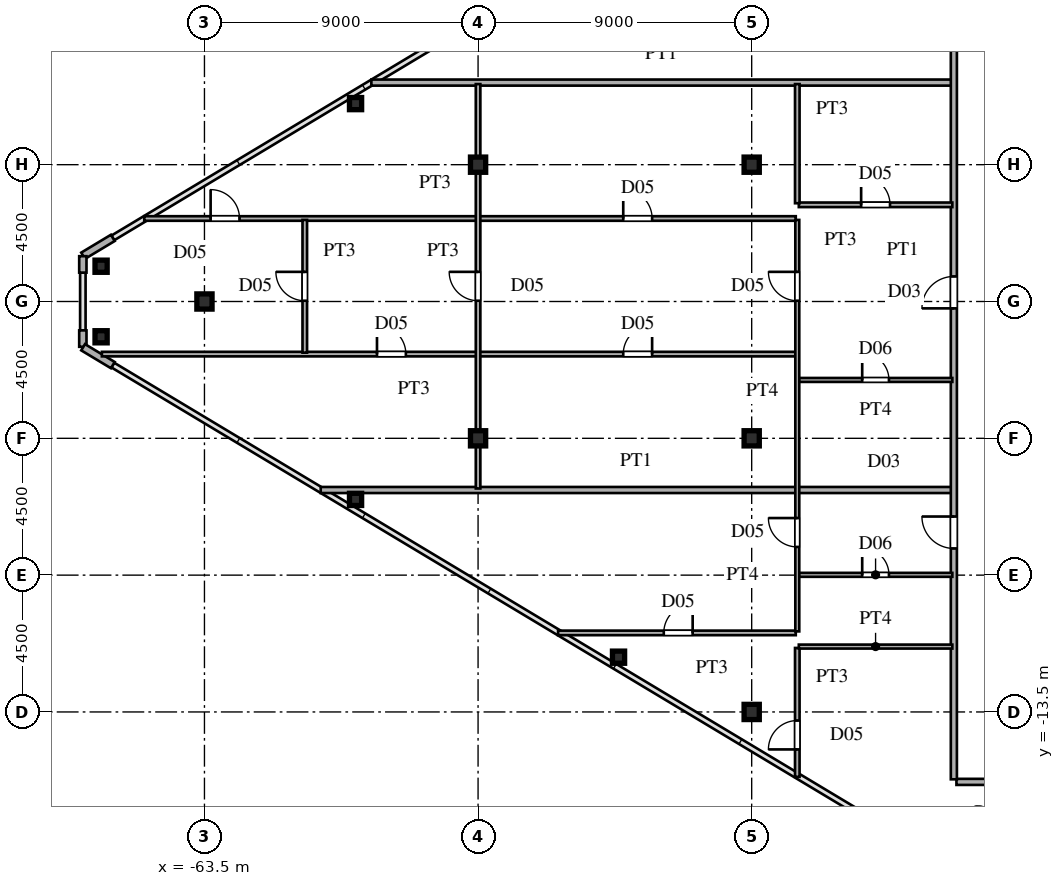
"""IFC4 building model, lengths in metres.
Left out: names, types, materials, properties, quantities, classifications, styles, units other than length and angle.
Written with IfcOpenShell. Run it as: python <this file> out.ifc"""

import sys

from ifc_helpers import new_model, si_unit, direction, frame, frame_2d, origin, origin_2d, place, context, subcontext, project, spatial, rectangle, hollow_rectangle, i_section, extrude, source, transform, mapped, element, fill, save


model = new_model("IFC4")
c1 = context("Model", 3, precision=1e-05, world=origin(), true_north=direction((0.0, 1.0)))
c2 = subcontext(c1, "Body", "Model", "MODEL_VIEW")
j1 = project(units=[si_unit("LENGTHUNIT", "METRE"), si_unit("PLANEANGLEUNIT", "RADIAN")], contexts=[c1])
p1 = place(None, origin())
s1 = spatial("IfcSite", under=j1, at=p1, CompositionType="ELEMENT")
p2 = place(p1, origin())
s2 = spatial("IfcBuilding", under=s1, at=p2, CompositionType="ELEMENT")
p3 = place(p2, frame((0.0, 0.0, 195.9)))
s3 = spatial("IfcBuildingStorey", under=s2, at=p3, CompositionType="ELEMENT", Elevation=195.9)
m1 = source(origin(), c2, "Body", "SweptSolid", [
    extrude(i_section(OverallWidth=0.5, OverallDepth=0.5, WebThickness=0.02, FlangeThickness=0.032, at=origin_2d()), origin(), (0.0, 0.0, 1.0), 3.6),
])
for number, where, z_axis, x_axis in (
    (1, (-45.5, -13.5, 0.0), (0.0, 0.0, 1.0), (1.0, 0.0, 0.0)),
    (2, (-45.5, -4.5, 0.0), (0.0, 0.0, 1.0), (1.0, 0.0, 0.0)),
    (3, (-45.5, 4.5, 0.0), (0.0, 0.0, 1.0), (1.0, 0.0, 0.0)),
    (4, (-54.5, -4.5, 0.0), (0.0, 0.0, 1.0), (1.0, 0.0, 0.0)),
    (5, (-54.5, 4.5, 0.0), (0.0, 0.0, 1.0), (1.0, 0.0, 0.0)),
    (6, (-63.5, 0.0, 0.0), (0.0, 0.0, 1.0), (1.0, 0.0, 0.0)),
):
    element("IfcColumn", number, at=place(p3, frame(where, z_axis=z_axis, x_axis=x_axis)), inside=s3, PredefinedType="COLUMN", context=c2, shape_type="MappedRepresentation", body=[
        mapped(m1, transform((0.0, 0.0, 0.0), scale=1.0)),
    ])
m2 = source(origin(), c2, "Body", "SweptSolid", [
    extrude(hollow_rectangle(XDim=0.4, YDim=0.4, WallThickness=0.016, at=origin_2d()), origin(), (0.0, 0.0, 1.0), 3.6),
])
for number, where, z_axis, x_axis in (
    (7, (-66.9, 1.16, 0.0), (0.0, 0.0, 1.0), (1.0, 0.0, 0.0)),
    (8, (-66.9, -1.16, 0.0), (0.0, 0.0, 1.0), (1.0, 0.0, 0.0)),
    (9, (-49.88, -11.699, 0.0), (0.0, 0.0, 1.0), (1.0, 0.0, 0.0)),
    (10, (-58.53, -6.509, 0.0), (0.0, 0.0, 1.0), (1.0, 0.0, 0.0)),
    (11, (-58.53, 6.509, 0.0), (0.0, 0.0, 1.0), (1.0, 0.0, 0.0)),
):
    element("IfcColumn", number, at=place(p3, frame(where, z_axis=z_axis, x_axis=x_axis)), inside=s3, PredefinedType="COLUMN", context=c2, shape_type="MappedRepresentation", body=[
        mapped(m2, transform((0.0, 0.0, 0.0), scale=1.0)),
    ])
p4 = place(p3, frame((-66.514, 2.092, 0.0), z_axis=(0.0, 0.0, 1.0), x_axis=(-0.85743623509, -0.514590228002, 0.0)))
e12 = element("IfcWall", 12, at=p4, inside=s3, PredefinedType="SOLIDWALL", context=c2, shape_type="SweptSolid", body=[
    extrude(rectangle(XDim=1.14, YDim=0.24, at=frame_2d((0.57, 0.0))), origin(), (0.0, 0.0, 1.0), 3.38),
])
for number, where, z_axis, x_axis in (
    (13, (-67.5, 1.49, 0.0), (0.0, 0.0, 1.0), (0.0, -1.0, 0.0)),
    (14, (-67.5, -0.95, 0.0), (0.0, 0.0, 1.0), (0.0, -1.0, 0.0)),
):
    element("IfcWall", number, at=place(p3, frame(where, z_axis=z_axis, x_axis=x_axis)), inside=s3, PredefinedType="SOLIDWALL", context=c2, shape_type="SweptSolid", body=[
        extrude(rectangle(XDim=0.54, YDim=0.24, at=frame_2d((0.27, 0.0))), origin(), (0.0, 0.0, 1.0), 3.38),
    ])
p5 = place(p3, frame((-67.491, -1.505, 0.0), z_axis=(0.0, 0.0, 1.0), x_axis=(0.85743623509, -0.514590228002, 0.0)))
e15 = element("IfcWall", 15, at=p5, inside=s3, PredefinedType="SOLIDWALL", context=c2, shape_type="SweptSolid", body=[
    extrude(rectangle(XDim=1.14, YDim=0.24, at=frame_2d((0.57, 0.0))), origin(), (0.0, 0.0, 1.0), 3.38),
])
p6 = place(p3, frame((-38.765, -15.8, 0.0), z_axis=(0.0, 0.0, 1.0), x_axis=(1.0, 0.0, 0.0)))
e16 = element("IfcWall", 16, at=p6, inside=s3, PredefinedType="PARTITIONING", context=c2, shape_type="SweptSolid", body=[
    extrude(rectangle(XDim=11.14, YDim=0.2, at=frame_2d((5.57, 0.0))), origin(), (0.0, 0.0, 1.0), 3.38),
])
p7 = place(p3, frame((-43.95, -11.35, 0.0), z_axis=(0.0, 0.0, 1.0), x_axis=(1.0, 0.0, 0.0)))
e17 = element("IfcWall", 17, at=p7, inside=s3, PredefinedType="PARTITIONING", context=c2, shape_type="SweptSolid", body=[
    extrude(rectangle(XDim=5.05, YDim=0.13, at=frame_2d((2.525, 0.0))), origin(), (0.0, 0.0, 1.0), 3.38),
])
p8 = place(p3, frame((-51.868, -10.9, 0.0), z_axis=(0.0, 0.0, 1.0), x_axis=(1.0, 0.0, 0.0)))
e18 = element("IfcWall", 18, at=p8, inside=s3, PredefinedType="PARTITIONING", context=c2, shape_type="SweptSolid", body=[
    extrude(rectangle(XDim=7.818, YDim=0.15, at=frame_2d((3.909, 0.0))), origin(), (0.0, 0.0, 1.0), 3.38),
])
p9 = place(p8, frame((3.476, 0.0, 0.0)))
e19 = element("IfcOpeningElement", 19, at=p9, cuts=e18, PredefinedType="OPENING", context=c2, shape_type="SweptSolid", body=[
    extrude(rectangle(XDim=0.95, YDim=2.15, at=frame_2d((0.475, 1.075))), frame((0.0, 0.085, 0.0), z_axis=(0.0, -1.0, 0.0), x_axis=(1.0, 0.0, 0.0)), (0.0, 0.0, 1.0), 0.17),
])
p10 = place(p3, frame((-43.95, -8.99, 0.0), z_axis=(0.0, 0.0, 1.0), x_axis=(1.0, 0.0, 0.0)))
e20 = element("IfcWall", 20, at=p10, inside=s3, PredefinedType="PARTITIONING", context=c2, shape_type="SweptSolid", body=[
    extrude(rectangle(XDim=5.05, YDim=0.13, at=frame_2d((2.525, 0.0))), origin(), (0.0, 0.0, 1.0), 3.38),
])
p11 = place(p10, frame((2.085, 0.0, 0.0)))
e21 = element("IfcOpeningElement", 21, at=p11, cuts=e20, PredefinedType="OPENING", context=c2, shape_type="SweptSolid", body=[
    extrude(rectangle(XDim=0.88, YDim=2.1, at=frame_2d((0.44, 1.05))), frame((0.0, 0.075, 0.0), z_axis=(0.0, -1.0, 0.0), x_axis=(1.0, 0.0, 0.0)), (0.0, 0.0, 1.0), 0.15),
])
p12 = place(p3, frame((-59.676, -6.2, 0.0), z_axis=(0.0, 0.0, 1.0), x_axis=(1.0, 0.0, 0.0)))
e22 = element("IfcWall", 22, at=p12, inside=s3, PredefinedType="PARTITIONING", context=c2, shape_type="SweptSolid", body=[
    extrude(rectangle(XDim=20.746, YDim=0.2, at=frame_2d((10.373, 0.0))), origin(), (0.0, 0.0, 1.0), 3.38),
])
p13 = place(p3, frame((-43.95, -2.58, 0.0), z_axis=(0.0, 0.0, 1.0), x_axis=(1.0, 0.0, 0.0)))
e23 = element("IfcWall", 23, at=p13, inside=s3, PredefinedType="PARTITIONING", context=c2, shape_type="SweptSolid", body=[
    extrude(rectangle(XDim=5.05, YDim=0.13, at=frame_2d((2.525, 0.0))), origin(), (0.0, 0.0, 1.0), 3.38),
])
p14 = place(p13, frame((2.085, 0.0, 0.0)))
e24 = element("IfcOpeningElement", 24, at=p14, cuts=e23, PredefinedType="OPENING", context=c2, shape_type="SweptSolid", body=[
    extrude(rectangle(XDim=0.88, YDim=2.1, at=frame_2d((0.44, 1.05))), frame((0.0, 0.075, 0.0), z_axis=(0.0, -1.0, 0.0), x_axis=(1.0, 0.0, 0.0)), (0.0, 0.0, 1.0), 0.15),
])
p15 = place(p3, frame((-66.874, -1.73, 0.0), z_axis=(0.0, 0.0, 1.0), x_axis=(1.0, 0.0, 0.0)))
e25 = element("IfcWall", 25, at=p15, inside=s3, PredefinedType="PARTITIONING", context=c2, shape_type="SweptSolid", body=[
    extrude(rectangle(XDim=22.824, YDim=0.15, at=frame_2d((11.412, 0.0))), origin(), (0.0, 0.0, 1.0), 3.38),
])
p16 = place(p15, frame((17.149, 0.0, 0.0)))
e26 = element("IfcOpeningElement", 26, at=p16, cuts=e25, PredefinedType="OPENING", context=c2, shape_type="SweptSolid", body=[
    extrude(rectangle(XDim=0.95, YDim=2.15, at=frame_2d((0.475, 1.075))), frame((0.0, 0.085, 0.0), z_axis=(0.0, -1.0, 0.0), x_axis=(1.0, 0.0, 0.0)), (0.0, 0.0, 1.0), 0.17),
])
p17 = place(p15, frame((9.049, 0.0, 0.0)))
e27 = element("IfcOpeningElement", 27, at=p17, cuts=e25, PredefinedType="OPENING", context=c2, shape_type="SweptSolid", body=[
    extrude(rectangle(XDim=0.95, YDim=2.15, at=frame_2d((0.475, 1.075))), frame((0.0, 0.085, 0.0), z_axis=(0.0, -1.0, 0.0), x_axis=(1.0, 0.0, 0.0)), (0.0, 0.0, 1.0), 0.17),
])
p18 = place(p3, frame((-65.48, 2.73, 0.0), z_axis=(0.0, 0.0, 1.0), x_axis=(1.0, 0.0, 0.0)))
e28 = element("IfcWall", 28, at=p18, inside=s3, PredefinedType="PARTITIONING", context=c2, shape_type="SweptSolid", body=[
    extrude(rectangle(XDim=21.43, YDim=0.15, at=frame_2d((10.715, 0.0))), origin(), (0.0, 0.0, 1.0), 3.38),
])
p19 = place(p18, frame((15.755, 0.0, 0.0)))
e29 = element("IfcOpeningElement", 29, at=p19, cuts=e28, PredefinedType="OPENING", context=c2, shape_type="SweptSolid", body=[
    extrude(rectangle(XDim=0.95, YDim=2.15, at=frame_2d((0.475, 1.075))), frame((0.0, 0.085, 0.0), z_axis=(0.0, -1.0, 0.0), x_axis=(1.0, 0.0, 0.0)), (0.0, 0.0, 1.0), 0.17),
])
p20 = place(p18, frame((2.183, 0.0, 0.0)))
e30 = element("IfcOpeningElement", 30, at=p20, cuts=e28, PredefinedType="OPENING", context=c2, shape_type="SweptSolid", body=[
    extrude(rectangle(XDim=0.95, YDim=2.15, at=frame_2d((0.475, 1.075))), frame((0.0, 0.085, 0.0), z_axis=(0.0, -1.0, 0.0), x_axis=(1.0, 0.0, 0.0)), (0.0, 0.0, 1.0), 0.17),
])
p21 = place(p3, frame((-43.95, 3.18, 0.0), z_axis=(0.0, 0.0, 1.0), x_axis=(1.0, 0.0, 0.0)))
e31 = element("IfcWall", 31, at=p21, inside=s3, PredefinedType="PARTITIONING", context=c2, shape_type="SweptSolid", body=[
    extrude(rectangle(XDim=5.05, YDim=0.15, at=frame_2d((2.525, 0.0))), origin(), (0.0, 0.0, 1.0), 3.38),
])
p22 = place(p21, frame((2.05, 0.0, 0.0)))
e32 = element("IfcOpeningElement", 32, at=p22, cuts=e31, PredefinedType="OPENING", context=c2, shape_type="SweptSolid", body=[
    extrude(rectangle(XDim=0.95, YDim=2.15, at=frame_2d((0.475, 1.075))), frame((0.0, 0.085, 0.0), z_axis=(0.0, -1.0, 0.0), x_axis=(1.0, 0.0, 0.0)), (0.0, 0.0, 1.0), 0.17),
])
p23 = place(p3, frame((-58.01, 7.2, 0.0), z_axis=(0.0, 0.0, 1.0), x_axis=(1.0, 0.0, 0.0)))
e33 = element("IfcWall", 33, at=p23, inside=s3, PredefinedType="PARTITIONING", context=c2, shape_type="SweptSolid", body=[
    extrude(rectangle(XDim=19.08, YDim=0.2, at=frame_2d((9.54, 0.0))), origin(), (0.0, 0.0, 1.0), 3.38),
])
p24 = place(p3, frame((-60.2, -1.683, 0.0), z_axis=(0.0, 0.0, 1.0), x_axis=(0.0, 1.0, 0.0)))
e34 = element("IfcWall", 34, at=p24, inside=s3, PredefinedType="PARTITIONING", context=c2, shape_type="SweptSolid", body=[
    extrude(rectangle(XDim=4.366, YDim=0.15, at=frame_2d((2.183, 0.0))), origin(), (0.0, 0.0, 1.0), 3.38),
])
p25 = place(p24, frame((1.708, 0.0, 0.0)))
e35 = element("IfcOpeningElement", 35, at=p25, cuts=e34, PredefinedType="OPENING", context=c2, shape_type="SweptSolid", body=[
    extrude(rectangle(XDim=0.95, YDim=2.15, at=frame_2d((0.475, 1.075))), frame((0.0, 0.085, 0.0), z_axis=(0.0, -1.0, 0.0), x_axis=(1.0, 0.0, 0.0)), (0.0, 0.0, 1.0), 0.17),
])
p26 = place(p3, frame((-54.5, -6.15, 0.0), z_axis=(0.0, 0.0, 1.0), x_axis=(0.0, 1.0, 0.0)))
e36 = element("IfcWall", 36, at=p26, inside=s3, PredefinedType="PARTITIONING", context=c2, shape_type="SweptSolid", body=[
    extrude(rectangle(XDim=13.3, YDim=0.15, at=frame_2d((6.65, 0.0))), origin(), (0.0, 0.0, 1.0), 2.78),
])
p27 = place(p26, frame((6.175, 0.0, 0.0)))
e37 = element("IfcOpeningElement", 37, at=p27, cuts=e36, PredefinedType="OPENING", context=c2, shape_type="SweptSolid", body=[
    extrude(rectangle(XDim=0.95, YDim=2.15, at=frame_2d((0.475, 1.075))), frame((0.0, 0.085, 0.0), z_axis=(0.0, -1.0, 0.0), x_axis=(1.0, 0.0, 0.0)), (0.0, 0.0, 1.0), 0.17),
])
p28 = place(p3, frame((-44.0, -15.635, 0.0), z_axis=(0.0, 0.0, 1.0), x_axis=(0.0, 1.0, 0.0)))
e38 = element("IfcWall", 38, at=p28, inside=s3, PredefinedType="PARTITIONING", context=c2, shape_type="SweptSolid", body=[
    extrude(rectangle(XDim=4.24, YDim=0.15, at=frame_2d((2.12, 0.0))), origin(), (0.0, 0.0, 1.0), 3.38),
])
p29 = place(p28, frame((0.903, 0.0, 0.0)))
e39 = element("IfcOpeningElement", 39, at=p29, cuts=e38, PredefinedType="OPENING", context=c2, shape_type="SweptSolid", body=[
    extrude(rectangle(XDim=0.95, YDim=2.15, at=frame_2d((0.475, 1.075))), frame((0.0, 0.085, 0.0), z_axis=(0.0, -1.0, 0.0), x_axis=(1.0, 0.0, 0.0)), (0.0, 0.0, 1.0), 0.17),
])
p30 = place(p3, frame((-44.0, -10.85, 0.0), z_axis=(0.0, 0.0, 1.0), x_axis=(0.0, 1.0, 0.0)))
e40 = element("IfcWall", 40, at=p30, inside=s3, PredefinedType="PARTITIONING", context=c2, shape_type="SweptSolid", body=[
    extrude(rectangle(XDim=13.533, YDim=0.13, at=frame_2d((6.767, 0.0))), origin(), (0.0, 0.0, 1.0), 3.38),
])
p31 = place(p30, frame((2.778, 0.0, 0.0)))
e41 = element("IfcOpeningElement", 41, at=p31, cuts=e40, PredefinedType="OPENING", context=c2, shape_type="SweptSolid", body=[
    extrude(rectangle(XDim=0.95, YDim=2.15, at=frame_2d((0.475, 1.075))), frame((0.0, 0.075, 0.0), z_axis=(0.0, -1.0, 0.0), x_axis=(1.0, 0.0, 0.0)), (0.0, 0.0, 1.0), 0.15),
])
p32 = place(p30, frame((10.875, 0.0, 0.0)))
e42 = element("IfcOpeningElement", 42, at=p32, cuts=e40, PredefinedType="OPENING", context=c2, shape_type="SweptSolid", body=[
    extrude(rectangle(XDim=0.95, YDim=2.15, at=frame_2d((0.475, 1.075))), frame((0.0, 0.075, 0.0), z_axis=(0.0, -1.0, 0.0), x_axis=(1.0, 0.0, 0.0)), (0.0, 0.0, 1.0), 0.15),
])
p33 = place(p3, frame((-44.0, 3.232, 0.0), z_axis=(0.0, 0.0, 1.0), x_axis=(0.0, 1.0, 0.0)))
e43 = element("IfcWall", 43, at=p33, inside=s3, PredefinedType="PARTITIONING", context=c2, shape_type="SweptSolid", body=[
    extrude(rectangle(XDim=3.918, YDim=0.15, at=frame_2d((1.959, 0.0))), origin(), (0.0, 0.0, 1.0), 3.38),
])
p34 = place(p3, frame((-38.85, -15.715, 0.0), z_axis=(0.0, 0.0, 1.0), x_axis=(0.0, 1.0, 0.0)))
e44 = element("IfcWall", 44, at=p34, inside=s3, PredefinedType="PARTITIONING", context=c2, shape_type="SweptSolid", body=[
    extrude(rectangle(XDim=31.43, YDim=0.2, at=frame_2d((15.715, 0.0))), origin(), (0.0, 0.0, 1.0), 3.38),
])
p35 = place(p34, frame((7.593, 0.0, 0.0)))
e45 = element("IfcOpeningElement", 45, at=p35, cuts=e44, PredefinedType="OPENING", context=c2, shape_type="SweptSolid", body=[
    extrude(rectangle(XDim=1.05, YDim=2.25, at=frame_2d((0.525, 1.125))), frame((0.0, 0.11, 0.0), z_axis=(0.0, -1.0, 0.0), x_axis=(1.0, 0.0, 0.0)), (0.0, 0.0, 1.0), 0.22),
])
p36 = place(p34, frame((15.489, 0.0, 0.0)))
e46 = element("IfcOpeningElement", 46, at=p36, cuts=e44, PredefinedType="OPENING", context=c2, shape_type="SweptSolid", body=[
    extrude(rectangle(XDim=1.05, YDim=2.25, at=frame_2d((0.525, 1.125))), frame((0.0, 0.11, 0.0), z_axis=(0.0, -1.0, 0.0), x_axis=(1.0, 0.0, 0.0)), (0.0, 0.0, 1.0), 0.22),
])
p37 = place(p34, frame((26.69, 0.0, 0.0)))
e47 = element("IfcOpeningElement", 47, at=p37, cuts=e44, PredefinedType="OPENING", context=c2, shape_type="SweptSolid", body=[
    extrude(rectangle(XDim=1.05, YDim=2.25, at=frame_2d((0.525, 1.125))), frame((0.0, 0.11, 0.0), z_axis=(0.0, -1.0, 0.0), x_axis=(1.0, 0.0, 0.0)), (0.0, 0.0, 1.0), 0.22),
])
m3 = source(origin(), c2, "Body", "SweptSolid", [
    extrude(rectangle(XDim=0.95, YDim=2.15, at=frame_2d((0.475, 1.075))), frame((0.0, 0.025, 0.0), z_axis=(0.0, -1.0, 0.0), x_axis=(1.0, 0.0, 0.0)), (0.0, 0.0, 1.0), 0.05),
])
p38 = place(p9, origin())
e48 = element("IfcDoor", 48, at=p38, inside=s3, OperationType="SINGLE_SWING_RIGHT", PredefinedType="DOOR", context=c2, shape_type="MappedRepresentation", body=[
    mapped(m3, transform((0.0, 0.0, 0.0), scale=1.0)),
])
fill(e19, e48)
m4 = source(origin(), c2, "Body", "SweptSolid", [
    extrude(rectangle(XDim=0.88, YDim=2.1, at=frame_2d((0.44, 1.05))), frame((0.0, 0.025, 0.0), z_axis=(0.0, -1.0, 0.0), x_axis=(1.0, 0.0, 0.0)), (0.0, 0.0, 1.0), 0.05),
])
p39 = place(p11, origin())
e49 = element("IfcDoor", 49, at=p39, inside=s3, OperationType="SINGLE_SWING_LEFT", PredefinedType="DOOR", context=c2, shape_type="MappedRepresentation", body=[
    mapped(m4, transform((0.0, 0.0, 0.0), scale=1.0)),
])
fill(e21, e49)
p40 = place(p14, origin())
e50 = element("IfcDoor", 50, at=p40, inside=s3, OperationType="SINGLE_SWING_LEFT", PredefinedType="DOOR", context=c2, shape_type="MappedRepresentation", body=[
    mapped(m4, transform((0.0, 0.0, 0.0), scale=1.0)),
])
fill(e24, e50)
p41 = place(p16, origin())
e51 = element("IfcDoor", 51, at=p41, inside=s3, OperationType="SINGLE_SWING_RIGHT", PredefinedType="DOOR", context=c2, shape_type="MappedRepresentation", body=[
    mapped(m3, transform((0.0, 0.0, 0.0), scale=1.0)),
])
fill(e26, e51)
p42 = place(p17, origin())
e52 = element("IfcDoor", 52, at=p42, inside=s3, OperationType="SINGLE_SWING_LEFT", PredefinedType="DOOR", context=c2, shape_type="MappedRepresentation", body=[
    mapped(m3, transform((0.0, 0.0, 0.0), scale=1.0)),
])
fill(e27, e52)
p43 = place(p19, origin())
e53 = element("IfcDoor", 53, at=p43, inside=s3, OperationType="SINGLE_SWING_LEFT", PredefinedType="DOOR", context=c2, shape_type="MappedRepresentation", body=[
    mapped(m3, transform((0.0, 0.0, 0.0), scale=1.0)),
])
fill(e29, e53)
p44 = place(p20, origin())
e54 = element("IfcDoor", 54, at=p44, inside=s3, OperationType="SINGLE_SWING_LEFT", PredefinedType="DOOR", context=c2, shape_type="MappedRepresentation", body=[
    mapped(m3, transform((0.0, 0.0, 0.0), scale=1.0)),
])
fill(e30, e54)
p45 = place(p22, origin())
e55 = element("IfcDoor", 55, at=p45, inside=s3, OperationType="SINGLE_SWING_LEFT", PredefinedType="DOOR", context=c2, shape_type="MappedRepresentation", body=[
    mapped(m3, transform((0.0, 0.0, 0.0), scale=1.0)),
])
fill(e32, e55)
p46 = place(p25, origin())
e56 = element("IfcDoor", 56, at=p46, inside=s3, OperationType="SINGLE_SWING_RIGHT", PredefinedType="DOOR", context=c2, shape_type="MappedRepresentation", body=[
    mapped(m3, transform((0.0, 0.0, 0.0), scale=1.0)),
])
fill(e35, e56)
p47 = place(p27, origin())
e57 = element("IfcDoor", 57, at=p47, inside=s3, OperationType="SINGLE_SWING_RIGHT", PredefinedType="DOOR", context=c2, shape_type="MappedRepresentation", body=[
    mapped(m3, transform((0.0, 0.0, 0.0), scale=1.0)),
])
fill(e37, e57)
p48 = place(p29, origin())
e58 = element("IfcDoor", 58, at=p48, inside=s3, OperationType="SINGLE_SWING_LEFT", PredefinedType="DOOR", context=c2, shape_type="MappedRepresentation", body=[
    mapped(m3, transform((0.0, 0.0, 0.0), scale=1.0)),
])
fill(e39, e58)
p49 = place(p31, origin())
e59 = element("IfcDoor", 59, at=p49, inside=s3, OperationType="SINGLE_SWING_RIGHT", PredefinedType="DOOR", context=c2, shape_type="MappedRepresentation", body=[
    mapped(m3, transform((0.0, 0.0, 0.0), scale=1.0)),
])
fill(e41, e59)
p50 = place(p32, origin())
e60 = element("IfcDoor", 60, at=p50, inside=s3, OperationType="SINGLE_SWING_RIGHT", PredefinedType="DOOR", context=c2, shape_type="MappedRepresentation", body=[
    mapped(m3, transform((0.0, 0.0, 0.0), scale=1.0)),
])
fill(e42, e60)
m5 = source(origin(), c2, "Body", "SweptSolid", [
    extrude(rectangle(XDim=1.05, YDim=2.25, at=frame_2d((0.525, 1.125))), frame((0.0, 0.025, 0.0), z_axis=(0.0, -1.0, 0.0), x_axis=(1.0, 0.0, 0.0)), (0.0, 0.0, 1.0), 0.05),
])
p51 = place(p35, origin())
e61 = element("IfcDoor", 61, at=p51, inside=s3, OperationType="SINGLE_SWING_RIGHT", PredefinedType="DOOR", context=c2, shape_type="MappedRepresentation", body=[
    mapped(m5, transform((0.0, 0.0, 0.0), scale=1.0)),
])
fill(e45, e61)
p52 = place(p36, origin())
e62 = element("IfcDoor", 62, at=p52, inside=s3, OperationType="SINGLE_SWING_LEFT", PredefinedType="DOOR", context=c2, shape_type="MappedRepresentation", body=[
    mapped(m5, transform((0.0, 0.0, 0.0), scale=1.0)),
])
fill(e46, e62)
save(model, sys.argv[1])
